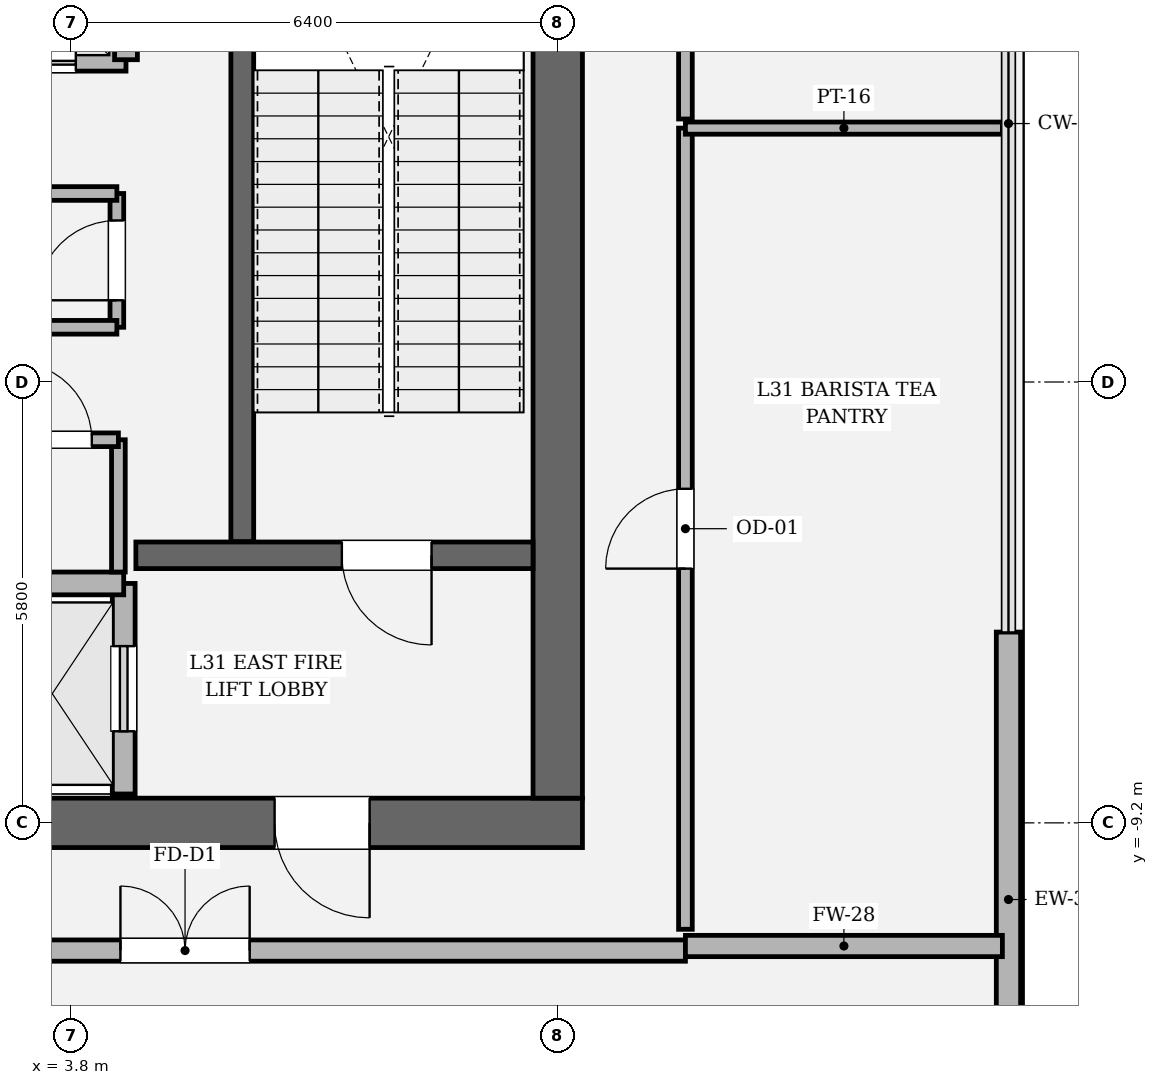
"""IFC4 building model, lengths in metres.
Left out: names, types, materials, properties, quantities, classifications, styles, units other than length and angle.
Written with IfcOpenShell. Run it as: python <this file> out.ifc"""

import sys

from ifc_helpers import new_model, si_unit, direction, frame, frame_2d, origin, place, context, subcontext, project, spatial, rectangle, extrude, element, fill, save


model = new_model("IFC4")
c1 = context("Model", 3, precision=1e-05, world=origin(), true_north=direction((0.0, 1.0)))
c2 = subcontext(c1, "Body", "Model", "MODEL_VIEW")
j1 = project(units=[si_unit("LENGTHUNIT", "METRE"), si_unit("PLANEANGLEUNIT", "RADIAN")], contexts=[c1])
p1 = place(None, origin())
s1 = spatial("IfcSite", under=j1, at=p1, CompositionType="ELEMENT")
p2 = place(p1, origin())
s2 = spatial("IfcBuilding", under=s1, at=p2, CompositionType="ELEMENT")
p3 = place(p2, frame((0.0, 0.0, 135.0)))
s3 = spatial("IfcBuildingStorey", under=s2, at=p3, CompositionType="ELEMENT", Elevation=135.0)
p4 = place(p3, frame((10.525, -9.2, 0.0), z_axis=(0.0, 0.0, 1.0), x_axis=(-1.0, 0.0, 0.0)))
e1 = element("IfcWall", 1, at=p4, inside=s3, PredefinedType="SHEAR", context=c2, shape_type="SweptSolid", body=[
    extrude(rectangle(XDim=21.05, YDim=0.65, at=frame_2d((10.525, 0.0))), origin(), (0.0, 0.0, 1.0), 4.8),
])
p5 = place(p4, frame((2.8, 0.0, 0.0)))
e2 = element("IfcOpeningElement", 2, at=p5, cuts=e1, PredefinedType="OPENING", context=c2, shape_type="SweptSolid", body=[
    extrude(rectangle(XDim=1.25, YDim=2.25, at=frame_2d((0.625, 1.125))), frame((0.0, 0.335, 0.0), z_axis=(0.0, -1.0, 0.0), x_axis=(1.0, 0.0, 0.0)), (0.0, 0.0, 1.0), 0.67),
])
p6 = place(p4, frame((17.0, 0.0, 0.0)))
e3 = element("IfcOpeningElement", 3, at=p6, cuts=e1, PredefinedType="OPENING", context=c2, shape_type="SweptSolid", body=[
    extrude(rectangle(XDim=1.25, YDim=2.25, at=frame_2d((0.625, 1.125))), frame((0.0, 0.335, 0.0), z_axis=(0.0, -1.0, 0.0), x_axis=(1.0, 0.0, 0.0)), (0.0, 0.0, 1.0), 0.67),
])
p7 = place(p3, frame((10.2, 8.875, 0.0), z_axis=(0.0, 0.0, 1.0), x_axis=(0.0, -1.0, 0.0)))
e4 = element("IfcWall", 4, at=p7, inside=s3, PredefinedType="SHEAR", context=c2, shape_type="SweptSolid", body=[
    extrude(rectangle(XDim=17.75, YDim=0.65, at=frame_2d((8.875, 0.0))), origin(), (0.0, 0.0, 1.0), 4.8),
])
p8 = place(p7, frame((3.905, 0.0, 0.0)))
e5 = element("IfcOpeningElement", 5, at=p8, cuts=e4, PredefinedType="OPENING", context=c2, shape_type="SweptSolid", body=[
    extrude(rectangle(XDim=1.18, YDim=2.2, at=frame_2d((0.59, 1.1))), frame((0.0, 0.335, 0.0), z_axis=(0.0, -1.0, 0.0), x_axis=(1.0, 0.0, 0.0)), (0.0, 0.0, 1.0), 0.67),
])
p9 = place(p3, frame((6.05, 3.45, 0.0), z_axis=(0.0, 0.0, 1.0), x_axis=(0.0, -1.0, 0.0)))
e6 = element("IfcWall", 6, at=p9, inside=s3, PredefinedType="SOLIDWALL", context=c2, shape_type="SweptSolid", body=[
    extrude(rectangle(XDim=8.95, YDim=0.3, at=frame_2d((4.475, 0.0))), origin(), (0.0, 0.0, 1.0), 4.8),
])
p10 = place(p3, frame((4.65, -5.68, 0.0), z_axis=(0.0, 0.0, 1.0), x_axis=(1.0, 0.0, 0.0)))
e7 = element("IfcWall", 7, at=p10, inside=s3, PredefinedType="SOLIDWALL", context=c2, shape_type="SweptSolid", body=[
    extrude(rectangle(XDim=5.225, YDim=0.35, at=frame_2d((2.613, 0.0))), origin(), (0.0, 0.0, 1.0), 4.8),
])
p11 = place(p10, frame((2.71, 0.0, 0.0)))
e8 = element("IfcOpeningElement", 8, at=p11, cuts=e7, PredefinedType="OPENING", context=c2, shape_type="SweptSolid", body=[
    extrude(rectangle(XDim=1.18, YDim=2.2, at=frame_2d((0.59, 1.1))), frame((0.0, 0.185, 0.0), z_axis=(0.0, -1.0, 0.0), x_axis=(1.0, 0.0, 0.0)), (0.0, 0.0, 1.0), 0.37),
])
p12 = place(p3, frame((16.13, -13.727, 0.0), z_axis=(0.0, 0.0, 1.0), x_axis=(0.0, 1.0, 0.0)))
e9 = element("IfcWall", 9, at=p12, inside=s3, PredefinedType="SOLIDWALL", context=c2, shape_type="SweptSolid", body=[
    extrude(rectangle(XDim=7.037, YDim=0.32, at=frame_2d((3.519, 0.0))), origin(), (0.0, 0.0, 1.0), 3.194),
])
p13 = place(p3, frame((4.49, -8.82, 0.0), z_axis=(0.0, 0.0, 1.0), x_axis=(0.0, 1.0, 0.0)))
e10 = element("IfcWall", 10, at=p13, inside=s3, PredefinedType="SOLIDWALL", context=c2, shape_type="SweptSolid", body=[
    extrude(rectangle(XDim=2.77, YDim=0.3, at=frame_2d((1.385, 0.0))), origin(), (0.0, 0.0, 1.0), 4.52),
])
p14 = place(p13, frame((0.825, 0.0, 0.0)))
e11 = element("IfcOpeningElement", 11, at=p14, cuts=e10, PredefinedType="OPENING", context=c2, shape_type="SweptSolid", body=[
    extrude(rectangle(XDim=1.12, YDim=2.25, at=frame_2d((0.56, 1.125))), frame((0.0, 0.16, 0.0), z_axis=(0.0, -1.0, 0.0), x_axis=(1.0, 0.0, 0.0)), (0.0, 0.0, 1.0), 0.32),
])
p15 = place(p3, frame((2.61, -6.05, 0.0), z_axis=(0.0, 0.0, 1.0), x_axis=(1.0, 0.0, 0.0)))
e12 = element("IfcWall", 12, at=p15, inside=s3, PredefinedType="SOLIDWALL", context=c2, shape_type="SweptSolid", body=[
    extrude(rectangle(XDim=1.88, YDim=0.3, at=frame_2d((0.94, 0.0))), origin(), (0.0, 0.0, 1.0), 4.52),
])
p16 = place(p3, frame((-4.52, 0.84, 0.0), z_axis=(0.0, 0.0, 1.0), x_axis=(1.0, 0.0, 0.0)))
e13 = element("IfcWall", 13, at=p16, inside=s3, PredefinedType="SOLIDWALL", context=c2, shape_type="SweptSolid", body=[
    extrude(rectangle(XDim=9.04, YDim=0.3, at=frame_2d((4.52, 0.0))), origin(), (0.0, 0.0, 1.0), 4.52),
])
p17 = place(p16, frame((0.66, 0.0, 0.0)))
e14 = element("IfcOpeningElement", 14, at=p17, cuts=e13, PredefinedType="OPENING", context=c2, shape_type="SweptSolid", body=[
    extrude(rectangle(XDim=1.12, YDim=2.25, at=frame_2d((0.56, 1.125))), frame((0.0, 0.16, 0.0), z_axis=(0.0, -1.0, 0.0), x_axis=(1.0, 0.0, 0.0)), (0.0, 0.0, 1.0), 0.32),
])
p18 = place(p16, frame((2.86, 0.0, 0.0)))
e15 = element("IfcOpeningElement", 15, at=p18, cuts=e13, PredefinedType="OPENING", context=c2, shape_type="SweptSolid", body=[
    extrude(rectangle(XDim=1.12, YDim=2.25, at=frame_2d((0.56, 1.125))), frame((0.0, 0.16, 0.0), z_axis=(0.0, -1.0, 0.0), x_axis=(1.0, 0.0, 0.0)), (0.0, 0.0, 1.0), 0.32),
])
p19 = place(p16, frame((5.06, 0.0, 0.0)))
e16 = element("IfcOpeningElement", 16, at=p19, cuts=e13, PredefinedType="OPENING", context=c2, shape_type="SweptSolid", body=[
    extrude(rectangle(XDim=1.12, YDim=2.25, at=frame_2d((0.56, 1.125))), frame((0.0, 0.16, 0.0), z_axis=(0.0, -1.0, 0.0), x_axis=(1.0, 0.0, 0.0)), (0.0, 0.0, 1.0), 0.32),
])
p20 = place(p16, frame((7.26, 0.0, 0.0)))
e17 = element("IfcOpeningElement", 17, at=p20, cuts=e13, PredefinedType="OPENING", context=c2, shape_type="SweptSolid", body=[
    extrude(rectangle(XDim=1.12, YDim=2.25, at=frame_2d((0.56, 1.125))), frame((0.0, 0.16, 0.0), z_axis=(0.0, -1.0, 0.0), x_axis=(1.0, 0.0, 0.0)), (0.0, 0.0, 1.0), 0.32),
])
p21 = place(p3, frame((4.52, 0.84, 0.0), z_axis=(0.0, 0.0, 1.0), x_axis=(0.0, 1.0, 0.0)))
e18 = element("IfcWall", 18, at=p21, inside=s3, PredefinedType="SOLIDWALL", context=c2, shape_type="SweptSolid", body=[
    extrude(rectangle(XDim=1.88, YDim=0.3, at=frame_2d((0.94, 0.0))), origin(), (0.0, 0.0, 1.0), 4.52),
])
p22 = place(p3, frame((4.42, -5.9, 0.0), z_axis=(0.0, 0.0, 1.0), x_axis=(0.0, 1.0, 0.0)))
e19 = element("IfcWall", 19, at=p22, inside=s3, PredefinedType="PARTITIONING", context=c2, shape_type="SweptSolid", body=[
    extrude(rectangle(XDim=1.74, YDim=0.18, at=frame_2d((0.87, 0.0))), origin(), (0.0, 0.0, 1.0), 4.52),
])
p23 = place(p3, frame((4.42, -4.16, 0.0), z_axis=(0.0, 0.0, 1.0), x_axis=(-1.0, 0.0, 0.0)))
e20 = element("IfcWall", 20, at=p23, inside=s3, PredefinedType="PARTITIONING", context=c2, shape_type="SweptSolid", body=[
    extrude(rectangle(XDim=1.72, YDim=0.18, at=frame_2d((0.86, 0.0))), origin(), (0.0, 0.0, 1.0), 4.52),
])
p24 = place(p23, frame((0.35, 0.0, 0.0)))
e21 = element("IfcOpeningElement", 21, at=p24, cuts=e20, PredefinedType="OPENING", context=c2, shape_type="SweptSolid", body=[
    extrude(rectangle(XDim=1.02, YDim=2.2, at=frame_2d((0.51, 1.1))), frame((0.0, 0.1, 0.0), z_axis=(0.0, -1.0, 0.0), x_axis=(1.0, 0.0, 0.0)), (0.0, 0.0, 1.0), 0.2),
])
p25 = place(p3, frame((4.4, -2.68, 0.0), z_axis=(0.0, 0.0, 1.0), x_axis=(0.0, 1.0, 0.0)))
e22 = element("IfcWall", 22, at=p25, inside=s3, PredefinedType="PARTITIONING", context=c2, shape_type="SweptSolid", body=[
    extrude(rectangle(XDim=1.76, YDim=0.18, at=frame_2d((0.88, 0.0))), origin(), (0.0, 0.0, 1.0), 4.52),
])
p26 = place(p25, frame((0.355, 0.0, 0.0)))
e23 = element("IfcOpeningElement", 23, at=p26, cuts=e22, PredefinedType="OPENING", context=c2, shape_type="SweptSolid", body=[
    extrude(rectangle(XDim=1.05, YDim=2.2, at=frame_2d((0.525, 1.1))), frame((0.0, 0.1, 0.0), z_axis=(0.0, -1.0, 0.0), x_axis=(1.0, 0.0, 0.0)), (0.0, 0.0, 1.0), 0.2),
])
for number, where, z_axis, x_axis in (
    (24, (4.4, -0.92, 0.0), (0.0, 0.0, 1.0), (-1.0, 0.0, 0.0)),
    (25, (1.6, -2.68, 0.0), (0.0, 0.0, 1.0), (1.0, 0.0, 0.0)),
):
    element("IfcWall", number, at=place(p3, frame(where, z_axis=z_axis, x_axis=x_axis)), inside=s3, PredefinedType="PARTITIONING", context=c2, shape_type="SweptSolid", body=[
        extrude(rectangle(XDim=2.8, YDim=0.18, at=frame_2d((1.4, 0.0))), origin(), (0.0, 0.0, 1.0), 4.52),
    ])
p27 = place(p3, frame((-1.286, -10.88, 0.0), z_axis=(0.0, 0.0, 1.0), x_axis=(1.0, 0.0, 0.0)))
e26 = element("IfcWall", 26, at=p27, inside=s3, PredefinedType="SOLIDWALL", context=c2, shape_type="SweptSolid", body=[
    extrude(rectangle(XDim=13.166, YDim=0.28, at=frame_2d((6.583, 0.0))), origin(), (0.0, 0.0, 1.0), 3.194),
])
p28 = place(p27, frame((5.733, 0.0, 0.0)))
e27 = element("IfcOpeningElement", 27, at=p28, cuts=e26, PredefinedType="OPENING", context=c2, shape_type="SweptSolid", body=[
    extrude(rectangle(XDim=1.7, YDim=2.3, at=frame_2d((0.85, 1.15))), frame((0.0, 0.15, 0.0), z_axis=(0.0, -1.0, 0.0), x_axis=(1.0, 0.0, 0.0)), (0.0, 0.0, 1.0), 0.3),
])
p29 = place(p3, frame((11.88, -10.82, 0.0), z_axis=(0.0, 0.0, 1.0), x_axis=(1.0, 0.0, 0.0)))
e28 = element("IfcWall", 28, at=p29, inside=s3, PredefinedType="SOLIDWALL", context=c2, shape_type="SweptSolid", body=[
    extrude(rectangle(XDim=4.17, YDim=0.28, at=frame_2d((2.085, 0.0))), origin(), (0.0, 0.0, 1.0), 4.114),
])
p30 = place(p3, frame((11.88, -10.6, 0.0), z_axis=(0.0, 0.0, 1.0), x_axis=(0.0, 1.0, 0.0)))
e29 = element("IfcWall", 29, at=p30, inside=s3, PredefinedType="PARTITIONING", context=c2, shape_type="SweptSolid", body=[
    extrude(rectangle(XDim=10.54, YDim=0.18, at=frame_2d((5.27, 0.0))), origin(), (0.0, 0.0, 1.0), 3.194),
])
p31 = place(p30, frame((4.745, 0.0, 0.0)))
e30 = element("IfcOpeningElement", 30, at=p31, cuts=e29, PredefinedType="OPENING", context=c2, shape_type="SweptSolid", body=[
    extrude(rectangle(XDim=1.05, YDim=2.2, at=frame_2d((0.525, 1.1))), frame((0.0, 0.1, 0.0), z_axis=(0.0, -1.0, 0.0), x_axis=(1.0, 0.0, 0.0)), (0.0, 0.0, 1.0), 0.2),
])
p32 = place(p3, frame((11.88, -0.06, 0.0), z_axis=(0.0, 0.0, 1.0), x_axis=(1.0, 0.0, 0.0)))
e31 = element("IfcWall", 31, at=p32, inside=s3, PredefinedType="PARTITIONING", context=c2, shape_type="SweptSolid", body=[
    extrude(rectangle(XDim=4.17, YDim=0.16, at=frame_2d((2.085, 0.0))), origin(), (0.0, 0.0, 1.0), 4.52),
])
p33 = place(p3, frame((11.88, 0.06, 0.0), z_axis=(0.0, 0.0, 1.0), x_axis=(0.0, 1.0, 0.0)))
e32 = element("IfcWall", 32, at=p33, inside=s3, PredefinedType="PARTITIONING", context=c2, shape_type="SweptSolid", body=[
    extrude(rectangle(XDim=10.54, YDim=0.18, at=frame_2d((5.27, 0.0))), origin(), (0.0, 0.0, 1.0), 3.194),
])
p34 = place(p33, frame((4.745, 0.0, 0.0)))
e33 = element("IfcOpeningElement", 33, at=p34, cuts=e32, PredefinedType="OPENING", context=c2, shape_type="SweptSolid", body=[
    extrude(rectangle(XDim=1.05, YDim=2.2, at=frame_2d((0.525, 1.1))), frame((0.0, 0.1, 0.0), z_axis=(0.0, -1.0, 0.0), x_axis=(1.0, 0.0, 0.0)), (0.0, 0.0, 1.0), 0.2),
])
p35 = place(p11, origin())
e34 = element("IfcDoor", 34, at=p35, inside=s3, OperationType="SINGLE_SWING_RIGHT", PredefinedType="DOOR", context=c2, shape_type="SweptSolid", body=[
    extrude(rectangle(XDim=1.18, YDim=2.2, at=frame_2d((0.59, 1.1))), frame((0.0, 0.025, 0.0), z_axis=(0.0, -1.0, 0.0), x_axis=(1.0, 0.0, 0.0)), (0.0, 0.0, 1.0), 0.05),
])
fill(e8, e34)
p36 = place(p5, origin())
e35 = element("IfcDoor", 35, at=p36, inside=s3, OperationType="SINGLE_SWING_LEFT", PredefinedType="DOOR", context=c2, shape_type="SweptSolid", body=[
    extrude(rectangle(XDim=1.25, YDim=2.25, at=frame_2d((0.625, 1.125))), frame((0.0, 0.025, 0.0), z_axis=(0.0, -1.0, 0.0), x_axis=(1.0, 0.0, 0.0)), (0.0, 0.0, 1.0), 0.05),
])
fill(e2, e35)
p37 = place(p14, origin())
e36 = element("IfcDoor", 36, at=p37, inside=s3, OperationType="SLIDING_TO_RIGHT", PredefinedType="DOOR", context=c2, shape_type="SweptSolid", body=[
    extrude(rectangle(XDim=1.12, YDim=2.25, at=frame_2d((0.56, 1.125))), frame((0.0, 0.025, 0.0), z_axis=(0.0, -1.0, 0.0), x_axis=(1.0, 0.0, 0.0)), (0.0, 0.0, 1.0), 0.05),
])
fill(e11, e36)
p38 = place(p20, origin())
e37 = element("IfcDoor", 37, at=p38, inside=s3, OperationType="DOUBLE_DOOR_SLIDING", PredefinedType="DOOR", context=c2, shape_type="SweptSolid", body=[
    extrude(rectangle(XDim=1.12, YDim=2.25, at=frame_2d((0.56, 1.125))), frame((0.0, 0.025, 0.0), z_axis=(0.0, -1.0, 0.0), x_axis=(1.0, 0.0, 0.0)), (0.0, 0.0, 1.0), 0.05),
])
fill(e17, e37)
p39 = place(p24, origin())
e38 = element("IfcDoor", 38, at=p39, inside=s3, OperationType="SINGLE_SWING_RIGHT", PredefinedType="DOOR", context=c2, shape_type="SweptSolid", body=[
    extrude(rectangle(XDim=1.02, YDim=2.2, at=frame_2d((0.51, 1.1))), frame((0.0, 0.025, 0.0), z_axis=(0.0, -1.0, 0.0), x_axis=(1.0, 0.0, 0.0)), (0.0, 0.0, 1.0), 0.05),
])
fill(e21, e38)
p40 = place(p26, origin())
e39 = element("IfcDoor", 39, at=p40, inside=s3, OperationType="SINGLE_SWING_LEFT", PredefinedType="DOOR", context=c2, shape_type="SweptSolid", body=[
    extrude(rectangle(XDim=1.05, YDim=2.2, at=frame_2d((0.525, 1.1))), frame((0.0, 0.025, 0.0), z_axis=(0.0, -1.0, 0.0), x_axis=(1.0, 0.0, 0.0)), (0.0, 0.0, 1.0), 0.05),
])
fill(e23, e39)
p41 = place(p28, origin())
e40 = element("IfcDoor", 40, at=p41, inside=s3, OperationType="DOUBLE_DOOR_SINGLE_SWING", PredefinedType="DOOR", context=c2, shape_type="SweptSolid", body=[
    extrude(rectangle(XDim=1.7, YDim=2.3, at=frame_2d((0.85, 1.15))), frame((0.0, 0.025, 0.0), z_axis=(0.0, -1.0, 0.0), x_axis=(1.0, 0.0, 0.0)), (0.0, 0.0, 1.0), 0.05),
])
fill(e27, e40)
p42 = place(p31, origin())
e41 = element("IfcDoor", 41, at=p42, inside=s3, OperationType="SINGLE_SWING_LEFT", PredefinedType="DOOR", context=c2, shape_type="SweptSolid", body=[
    extrude(rectangle(XDim=1.05, YDim=2.2, at=frame_2d((0.525, 1.1))), frame((0.0, 0.025, 0.0), z_axis=(0.0, -1.0, 0.0), x_axis=(1.0, 0.0, 0.0)), (0.0, 0.0, 1.0), 0.05),
])
fill(e30, e41)
save(model, sys.argv[1])
